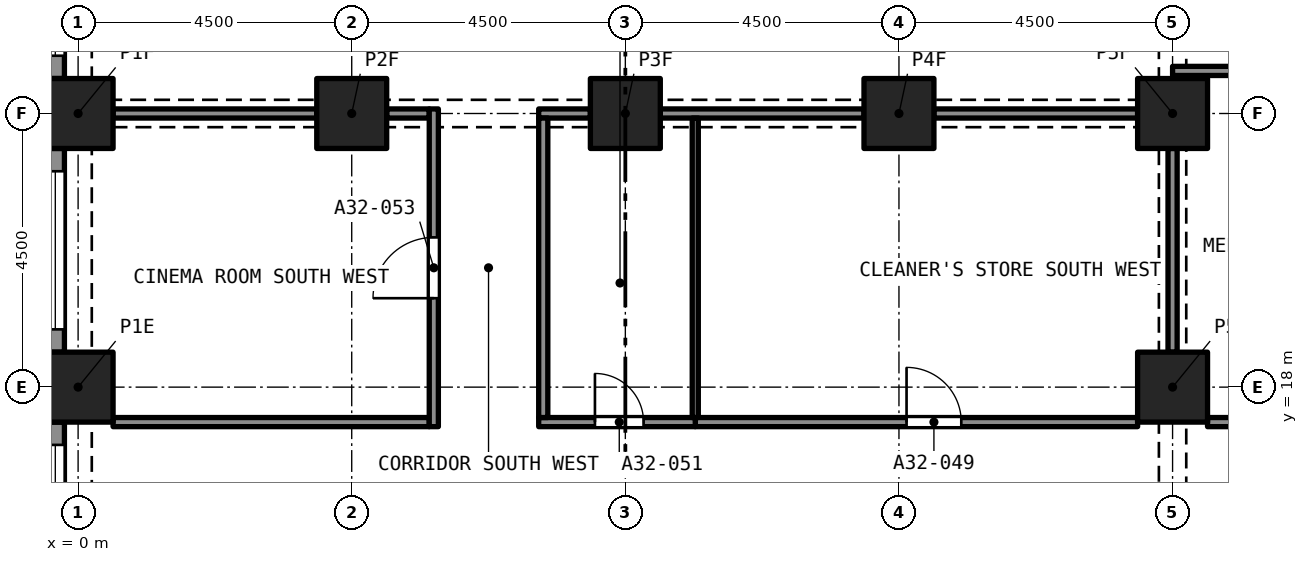
"""IFC4 building model, lengths in metres.
Left out: names, types, materials, properties, quantities, classifications, styles, units other than length and angle.
Written with IfcOpenShell. Run it as: python <this file> out.ifc"""

import sys

from ifc_helpers import new_model, si_unit, direction, frame, frame_2d, origin, origin_2d, place, context, subcontext, project, spatial, rectangle, extrude, element, fill, save


model = new_model("IFC4")
c1 = context("Model", 3, precision=1e-05, world=origin(), true_north=direction((0.0, 1.0)))
c2 = subcontext(c1, "Body", "Model", "MODEL_VIEW")
j1 = project(units=[si_unit("LENGTHUNIT", "METRE"), si_unit("PLANEANGLEUNIT", "RADIAN")], contexts=[c1])
p1 = place(None, origin())
s1 = spatial("IfcSite", under=j1, at=p1, CompositionType="ELEMENT")
p2 = place(p1, origin())
s2 = spatial("IfcBuilding", under=s1, at=p2, CompositionType="ELEMENT")
p3 = place(p2, frame((0.0, 0.0, 115.2)))
s3 = spatial("IfcBuildingStorey", under=s2, at=p3, CompositionType="ELEMENT", Elevation=115.2)
for number, where, z_axis, x_axis in (
    (1, (0.0, 18.0, 0.0), (0.0, 0.0, 1.0), (1.0, 0.0, 0.0)),
    (2, (18.0, 18.0, 0.0), (0.0, 0.0, 1.0), (1.0, 0.0, 0.0)),
    (3, (0.0, 22.5, 0.0), (0.0, 0.0, 1.0), (1.0, 0.0, 0.0)),
    (4, (4.5, 22.5, 0.0), (0.0, 0.0, 1.0), (1.0, 0.0, 0.0)),
    (5, (9.0, 22.5, 0.0), (0.0, 0.0, 1.0), (1.0, 0.0, 0.0)),
    (6, (13.5, 22.5, 0.0), (0.0, 0.0, 1.0), (1.0, 0.0, 0.0)),
    (7, (18.0, 22.5, 0.0), (0.0, 0.0, 1.0), (1.0, 0.0, 0.0)),
):
    element("IfcColumn", number, at=place(p3, frame(where, z_axis=z_axis, x_axis=x_axis)), inside=s3, PredefinedType="COLUMN", context=c2, shape_type="SweptSolid", body=[
        extrude(rectangle(XDim=1.15, YDim=1.15, at=origin_2d()), origin(), (0.0, 0.0, 1.0), 3.2),
    ])
p4 = place(p3, frame((-0.375, 23.075, 0.0), z_axis=(0.0, 0.0, 1.0), x_axis=(0.0, 1.0, 0.0)))
e8 = element("IfcWall", 8, at=p4, inside=s3, PredefinedType="SOLIDWALL", context=c2, shape_type="SweptSolid", body=[
    extrude(rectangle(XDim=3.35, YDim=0.3, at=frame_2d((1.675, 0.0))), origin(), (0.0, 0.0, 1.0), 3.2),
])
p5 = place(p4, frame((0.375, 0.0, 0.45)))
e9 = element("IfcOpeningElement", 9, at=p5, cuts=e8, PredefinedType="OPENING", context=c2, shape_type="SweptSolid", body=[
    extrude(rectangle(XDim=2.6, YDim=1.95, at=frame_2d((1.3, 0.975))), frame((0.0, 0.16, 0.0), z_axis=(0.0, -1.0, 0.0), x_axis=(1.0, 0.0, 0.0)), (0.0, 0.0, 1.0), 0.32),
])
p6 = place(p3, frame((-0.375, 18.575, 0.0), z_axis=(0.0, 0.0, 1.0), x_axis=(0.0, 1.0, 0.0)))
e10 = element("IfcWall", 10, at=p6, inside=s3, PredefinedType="SOLIDWALL", context=c2, shape_type="SweptSolid", body=[
    extrude(rectangle(XDim=3.35, YDim=0.3, at=frame_2d((1.675, 0.0))), origin(), (0.0, 0.0, 1.0), 3.2),
])
p7 = place(p6, frame((0.375, 0.0, 0.45)))
e11 = element("IfcOpeningElement", 11, at=p7, cuts=e10, PredefinedType="OPENING", context=c2, shape_type="SweptSolid", body=[
    extrude(rectangle(XDim=2.6, YDim=1.95, at=frame_2d((1.3, 0.975))), frame((0.0, 0.16, 0.0), z_axis=(0.0, -1.0, 0.0), x_axis=(1.0, 0.0, 0.0)), (0.0, 0.0, 1.0), 0.32),
])
p8 = place(p3, frame((-0.375, 14.075, 0.0), z_axis=(0.0, 0.0, 1.0), x_axis=(0.0, 1.0, 0.0)))
e12 = element("IfcWall", 12, at=p8, inside=s3, PredefinedType="SOLIDWALL", context=c2, shape_type="SweptSolid", body=[
    extrude(rectangle(XDim=3.35, YDim=0.3, at=frame_2d((1.675, 0.0))), origin(), (0.0, 0.0, 1.0), 3.2),
])
p9 = place(p8, frame((0.375, 0.0, 0.45)))
e13 = element("IfcOpeningElement", 13, at=p9, cuts=e12, PredefinedType="OPENING", context=c2, shape_type="SweptSolid", body=[
    extrude(rectangle(XDim=2.6, YDim=1.95, at=frame_2d((1.3, 0.975))), frame((0.0, 0.16, 0.0), z_axis=(0.0, -1.0, 0.0), x_axis=(1.0, 0.0, 0.0)), (0.0, 0.0, 1.0), 0.32),
])
p10 = place(p3, frame((18.575, 17.425, 0.0), z_axis=(0.0, 0.0, 1.0), x_axis=(1.0, 0.0, 0.0)))
e14 = element("IfcWall", 14, at=p10, inside=s3, PredefinedType="PARTITIONING", context=c2, shape_type="SweptSolid", body=[
    extrude(rectangle(XDim=5.2, YDim=0.15, at=frame_2d((2.6, 0.0))), origin(), (0.0, 0.0, 1.0), 2.75),
])
p11 = place(p3, frame((10.15, 17.425, 0.0), z_axis=(0.0, 0.0, 1.0), x_axis=(1.0, 0.0, 0.0)))
e15 = element("IfcWall", 15, at=p11, inside=s3, PredefinedType="PARTITIONING", context=c2, shape_type="SweptSolid", body=[
    extrude(rectangle(XDim=7.275, YDim=0.15, at=frame_2d((3.638, 0.0))), origin(), (0.0, 0.0, 1.0), 2.9),
])
p12 = place(p11, frame((3.475, 0.0, 0.0)))
e16 = element("IfcOpeningElement", 16, at=p12, cuts=e15, PredefinedType="OPENING", context=c2, shape_type="SweptSolid", body=[
    extrude(rectangle(XDim=0.9, YDim=2.1, at=frame_2d((0.45, 1.05))), frame((0.0, 0.085, 0.0), z_axis=(0.0, -1.0, 0.0), x_axis=(1.0, 0.0, 0.0)), (0.0, 0.0, 1.0), 0.17),
])
p13 = place(p3, frame((7.575, 17.425, 0.0), z_axis=(0.0, 0.0, 1.0), x_axis=(1.0, 0.0, 0.0)))
e17 = element("IfcWall", 17, at=p13, inside=s3, PredefinedType="PARTITIONING", context=c2, shape_type="SweptSolid", body=[
    extrude(rectangle(XDim=2.575, YDim=0.15, at=frame_2d((1.288, 0.0))), origin(), (0.0, 0.0, 1.0), 2.9),
])
p14 = place(p13, frame((0.925, 0.0, 0.0)))
e18 = element("IfcOpeningElement", 18, at=p14, cuts=e17, PredefinedType="OPENING", context=c2, shape_type="SweptSolid", body=[
    extrude(rectangle(XDim=0.8, YDim=2.1, at=frame_2d((0.4, 1.05))), frame((0.0, 0.085, 0.0), z_axis=(0.0, -1.0, 0.0), x_axis=(1.0, 0.0, 0.0)), (0.0, 0.0, 1.0), 0.17),
])
p15 = place(p3, frame((0.575, 17.425, 0.0), z_axis=(0.0, 0.0, 1.0), x_axis=(1.0, 0.0, 0.0)))
e19 = element("IfcWall", 19, at=p15, inside=s3, PredefinedType="PARTITIONING", context=c2, shape_type="SweptSolid", body=[
    extrude(rectangle(XDim=5.2, YDim=0.15, at=frame_2d((2.6, 0.0))), origin(), (0.0, 0.0, 1.0), 2.9),
])
p16 = place(p3, frame((18.0, 23.2, 0.0), z_axis=(0.0, 0.0, 1.0), x_axis=(1.0, 0.0, 0.0)))
e20 = element("IfcWall", 20, at=p16, inside=s3, PredefinedType="PARTITIONING", context=c2, shape_type="SweptSolid", body=[
    extrude(rectangle(XDim=5.775, YDim=0.15, at=frame_2d((2.887, 0.0))), origin(), (0.0, 0.0, 1.0), 2.75),
])
for number, where, z_axis, x_axis in (
    (21, (18.0, 18.575, 0.0), (0.0, 0.0, 1.0), (0.0, 1.0, 0.0)),
    (22, (14.075, 22.5, 0.0), (0.0, 0.0, 1.0), (1.0, 0.0, 0.0)),
    (23, (9.575, 22.5, 0.0), (0.0, 0.0, 1.0), (1.0, 0.0, 0.0)),
):
    element("IfcWall", number, at=place(p3, frame(where, z_axis=z_axis, x_axis=x_axis)), inside=s3, PredefinedType="PARTITIONING", context=c2, shape_type="SweptSolid", body=[
        extrude(rectangle(XDim=3.35, YDim=0.15, at=frame_2d((1.675, 0.0))), origin(), (0.0, 0.0, 1.0), 2.38),
    ])
p17 = place(p3, frame((7.575, 22.5, 0.0), z_axis=(0.0, 0.0, 1.0), x_axis=(1.0, 0.0, 0.0)))
e24 = element("IfcWall", 24, at=p17, inside=s3, PredefinedType="PARTITIONING", context=c2, shape_type="SweptSolid", body=[
    extrude(rectangle(XDim=0.85, YDim=0.15, at=frame_2d((0.425, 0.0))), origin(), (0.0, 0.0, 1.0), 2.38),
])
p18 = place(p3, frame((5.075, 22.5, 0.0), z_axis=(0.0, 0.0, 1.0), x_axis=(1.0, 0.0, 0.0)))
e25 = element("IfcWall", 25, at=p18, inside=s3, PredefinedType="PARTITIONING", context=c2, shape_type="SweptSolid", body=[
    extrude(rectangle(XDim=0.7, YDim=0.15, at=frame_2d((0.35, 0.0))), origin(), (0.0, 0.0, 1.0), 2.38),
])
p19 = place(p3, frame((0.575, 22.5, 0.0), z_axis=(0.0, 0.0, 1.0), x_axis=(1.0, 0.0, 0.0)))
e26 = element("IfcWall", 26, at=p19, inside=s3, PredefinedType="PARTITIONING", context=c2, shape_type="SweptSolid", body=[
    extrude(rectangle(XDim=3.35, YDim=0.15, at=frame_2d((1.675, 0.0))), origin(), (0.0, 0.0, 1.0), 2.38),
])
p20 = place(p3, frame((7.65, 17.5, 0.0), z_axis=(0.0, 0.0, 1.0), x_axis=(0.0, 1.0, 0.0)))
e27 = element("IfcWall", 27, at=p20, inside=s3, PredefinedType="PARTITIONING", context=c2, shape_type="SweptSolid", body=[
    extrude(rectangle(XDim=4.925, YDim=0.15, at=frame_2d((2.462, 0.0))), origin(), (0.0, 0.0, 1.0), 2.9),
])
p21 = place(p3, frame((5.85, 17.35, 0.0), z_axis=(0.0, 0.0, 1.0), x_axis=(0.0, 1.0, 0.0)))
e28 = element("IfcWall", 28, at=p21, inside=s3, PredefinedType="PARTITIONING", context=c2, shape_type="SweptSolid", body=[
    extrude(rectangle(XDim=5.225, YDim=0.15, at=frame_2d((2.612, 0.0))), origin(), (0.0, 0.0, 1.0), 2.9),
])
p22 = place(p21, frame((2.113, 0.0, 0.0)))
e29 = element("IfcOpeningElement", 29, at=p22, cuts=e28, PredefinedType="OPENING", context=c2, shape_type="SweptSolid", body=[
    extrude(rectangle(XDim=1.0, YDim=2.1, at=frame_2d((0.5, 1.05))), frame((0.0, 0.085, 0.0), z_axis=(0.0, -1.0, 0.0), x_axis=(1.0, 0.0, 0.0)), (0.0, 0.0, 1.0), 0.17),
])
p23 = place(p3, frame((10.15, 17.5, 0.0), z_axis=(0.0, 0.0, 1.0), x_axis=(0.0, 1.0, 0.0)))
e30 = element("IfcWall", 30, at=p23, inside=s3, PredefinedType="PARTITIONING", context=c2, shape_type="SweptSolid", body=[
    extrude(rectangle(XDim=4.925, YDim=0.1, at=frame_2d((2.462, 0.0))), origin(), (0.0, 0.0, 1.0), 2.9),
])
p24 = place(p5, origin())
e31 = element("IfcWindow", 31, at=p24, inside=s3, PartitioningType="SINGLE_PANEL", PredefinedType="WINDOW", context=c2, shape_type="SweptSolid", body=[
    extrude(rectangle(XDim=2.6, YDim=1.95, at=frame_2d((1.3, 0.975))), frame((0.0, 0.03, 0.0), z_axis=(0.0, -1.0, 0.0), x_axis=(1.0, 0.0, 0.0)), (0.0, 0.0, 1.0), 0.06),
])
fill(e9, e31)
p25 = place(p7, origin())
e32 = element("IfcWindow", 32, at=p25, inside=s3, PartitioningType="SINGLE_PANEL", PredefinedType="WINDOW", context=c2, shape_type="SweptSolid", body=[
    extrude(rectangle(XDim=2.6, YDim=1.95, at=frame_2d((1.3, 0.975))), frame((0.0, 0.03, 0.0), z_axis=(0.0, -1.0, 0.0), x_axis=(1.0, 0.0, 0.0)), (0.0, 0.0, 1.0), 0.06),
])
fill(e11, e32)
p26 = place(p9, origin())
e33 = element("IfcWindow", 33, at=p26, inside=s3, PartitioningType="SINGLE_PANEL", PredefinedType="WINDOW", context=c2, shape_type="SweptSolid", body=[
    extrude(rectangle(XDim=2.6, YDim=1.95, at=frame_2d((1.3, 0.975))), frame((0.0, 0.03, 0.0), z_axis=(0.0, -1.0, 0.0), x_axis=(1.0, 0.0, 0.0)), (0.0, 0.0, 1.0), 0.06),
])
fill(e13, e33)
p27 = place(p12, origin())
e34 = element("IfcDoor", 34, at=p27, inside=s3, OperationType="SINGLE_SWING_RIGHT", PredefinedType="DOOR", context=c2, shape_type="SweptSolid", body=[
    extrude(rectangle(XDim=0.9, YDim=2.1, at=frame_2d((0.45, 1.05))), frame((0.0, 0.025, 0.0), z_axis=(0.0, -1.0, 0.0), x_axis=(1.0, 0.0, 0.0)), (0.0, 0.0, 1.0), 0.05),
])
fill(e16, e34)
p28 = place(p14, origin())
e35 = element("IfcDoor", 35, at=p28, inside=s3, OperationType="SINGLE_SWING_RIGHT", PredefinedType="DOOR", context=c2, shape_type="SweptSolid", body=[
    extrude(rectangle(XDim=0.8, YDim=2.1, at=frame_2d((0.4, 1.05))), frame((0.0, 0.025, 0.0), z_axis=(0.0, -1.0, 0.0), x_axis=(1.0, 0.0, 0.0)), (0.0, 0.0, 1.0), 0.05),
])
fill(e18, e35)
p29 = place(p22, origin())
e36 = element("IfcDoor", 36, at=p29, inside=s3, OperationType="SINGLE_SWING_LEFT", PredefinedType="DOOR", context=c2, shape_type="SweptSolid", body=[
    extrude(rectangle(XDim=1.0, YDim=2.1, at=frame_2d((0.5, 1.05))), frame((0.0, 0.025, 0.0), z_axis=(0.0, -1.0, 0.0), x_axis=(1.0, 0.0, 0.0)), (0.0, 0.0, 1.0), 0.05),
])
fill(e29, e36)
save(model, sys.argv[1])
